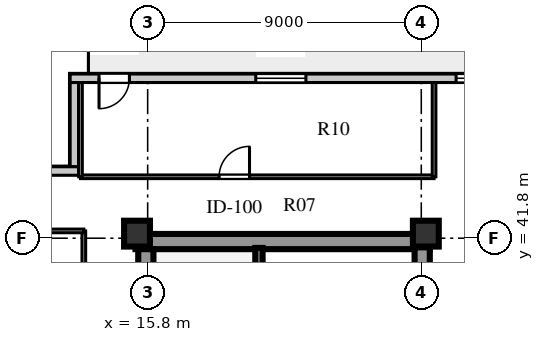
"""IFC4 building model, lengths in metres.
Left out: names, types, materials, properties, quantities, classifications, styles, units other than length and angle.
Written with IfcOpenShell. Run it as: python <this file> out.ifc"""

import sys

from ifc_helpers import new_model, si_unit, direction, frame, frame_2d, origin, origin_2d, place, context, subcontext, project, spatial, rectangle, extrude, element, fill, save


model = new_model("IFC4")
c1 = context("Model", 3, precision=1e-05, world=origin(), true_north=direction((0.0, 1.0)))
c2 = subcontext(c1, "Body", "Model", "MODEL_VIEW")
j1 = project(units=[si_unit("LENGTHUNIT", "METRE"), si_unit("PLANEANGLEUNIT", "RADIAN")], contexts=[c1])
p1 = place(None, origin())
s1 = spatial("IfcSite", under=j1, at=p1, CompositionType="ELEMENT")
p2 = place(p1, origin())
s2 = spatial("IfcBuilding", under=s1, at=p2, CompositionType="ELEMENT")
p3 = place(p2, frame((0.0, 0.0, 104.0)))
s3 = spatial("IfcBuildingStorey", under=s2, at=p3, CompositionType="ELEMENT", Elevation=104.0)
p4 = place(p3, frame((15.4, 41.69, 0.0), z_axis=(0.0, 0.0, 1.0), x_axis=(1.0, 0.0, 0.0)))
e1 = element("IfcWall", 1, at=p4, inside=s3, PredefinedType="SHEAR", context=c2, shape_type="SweptSolid", body=[
    extrude(rectangle(XDim=9.68, YDim=0.5, at=frame_2d((4.84, 0.0))), origin(), (0.0, 0.0, 1.0), 3.6),
])
p5 = place(p3, frame((15.74, 15.81, 0.0), z_axis=(0.0, 0.0, 1.0), x_axis=(0.0, 1.0, 0.0)))
e2 = element("IfcWall", 2, at=p5, inside=s3, PredefinedType="SHEAR", context=c2, shape_type="SweptSolid", body=[
    extrude(rectangle(XDim=25.63, YDim=0.5, at=frame_2d((12.815, 0.0))), origin(), (0.0, 0.0, 1.0), 3.6),
])
p6 = place(p3, frame((24.83, 15.74, 0.0), z_axis=(0.0, 0.0, 1.0), x_axis=(0.0, 1.0, 0.0)))
e3 = element("IfcWall", 3, at=p6, inside=s3, PredefinedType="SHEAR", context=c2, shape_type="SweptSolid", body=[
    extrude(rectangle(XDim=25.76, YDim=0.5, at=frame_2d((12.88, 0.0))), origin(), (0.0, 0.0, 1.0), 3.6),
])
p7 = place(p6, frame((1.61, 0.0, 0.0)))
e4 = element("IfcOpeningElement", 4, at=p7, cuts=e3, PredefinedType="OPENING", context=c2, shape_type="SweptSolid", body=[
    extrude(rectangle(XDim=1.2, YDim=2.1, at=frame_2d((0.6, 1.05))), frame((0.0, 0.26, 0.0), z_axis=(0.0, -1.0, 0.0), x_axis=(1.0, 0.0, 0.0)), (0.0, 0.0, 1.0), 0.52),
])
p8 = place(p6, frame((6.78, 0.0, 0.0)))
e5 = element("IfcOpeningElement", 5, at=p8, cuts=e3, PredefinedType="OPENING", context=c2, shape_type="SweptSolid", body=[
    extrude(rectangle(XDim=0.85, YDim=2.06, at=frame_2d((0.425, 1.03))), frame((0.0, 0.26, 0.0), z_axis=(0.0, -1.0, 0.0), x_axis=(1.0, 0.0, 0.0)), (0.0, 0.0, 1.0), 0.52),
])
p9 = place(p6, frame((12.11, 0.0, 0.0)))
e6 = element("IfcOpeningElement", 6, at=p9, cuts=e3, PredefinedType="OPENING", context=c2, shape_type="SweptSolid", body=[
    extrude(rectangle(XDim=1.5, YDim=2.12, at=frame_2d((0.75, 1.06))), frame((0.0, 0.26, 0.0), z_axis=(0.0, -1.0, 0.0), x_axis=(1.0, 0.0, 0.0)), (0.0, 0.0, 1.0), 0.52),
])
p10 = place(p6, frame((20.11, 0.0, 0.0)))
e7 = element("IfcOpeningElement", 7, at=p10, cuts=e3, PredefinedType="OPENING", context=c2, shape_type="SweptSolid", body=[
    extrude(rectangle(XDim=1.2, YDim=2.12, at=frame_2d((0.6, 1.06))), frame((0.0, 0.26, 0.0), z_axis=(0.0, -1.0, 0.0), x_axis=(1.0, 0.0, 0.0)), (0.0, 0.0, 1.0), 0.52),
])
p11 = place(p6, frame((24.01, 0.0, 0.0)))
e8 = element("IfcOpeningElement", 8, at=p11, cuts=e3, PredefinedType="OPENING", context=c2, shape_type="SweptSolid", body=[
    extrude(rectangle(XDim=0.95, YDim=2.1, at=frame_2d((0.475, 1.05))), frame((0.0, 0.26, 0.0), z_axis=(0.0, -1.0, 0.0), x_axis=(1.0, 0.0, 0.0)), (0.0, 0.0, 1.0), 0.52),
])
for number, where, z_axis, x_axis in (
    (9, (15.45, 41.95, 0.0), (0.0, 0.0, 1.0), (1.0, 0.0, 0.0)),
    (10, (24.95, 41.95, 0.0), (0.0, 0.0, 1.0), (1.0, 0.0, 0.0)),
):
    element("IfcColumn", number, at=place(p3, frame(where, z_axis=z_axis, x_axis=x_axis)), inside=s3, PredefinedType="COLUMN", context=c2, shape_type="SweptSolid", body=[
        extrude(rectangle(XDim=0.85, YDim=0.85, at=origin_2d()), origin(), (0.0, 0.0, 1.0), 3.6),
    ])
p12 = place(p3, frame((45.35, 47.06, 0.0), z_axis=(0.0, 0.0, 1.0), x_axis=(-1.0, 0.0, 0.0)))
e11 = element("IfcWall", 11, at=p12, inside=s3, PredefinedType="STANDARD", context=c2, shape_type="SweptSolid", body=[
    extrude(rectangle(XDim=32.1, YDim=0.28, at=frame_2d((16.05, 0.0))), origin(), (0.0, 0.0, 1.0), 3.6),
])
p13 = place(p12, frame((30.15, 0.0, 0.0)))
e12 = element("IfcOpeningElement", 12, at=p13, cuts=e11, PredefinedType="OPENING", context=c2, shape_type="SweptSolid", body=[
    extrude(rectangle(XDim=1.0, YDim=2.05, at=frame_2d((0.5, 1.025))), frame((0.0, 0.15, 0.0), z_axis=(0.0, -1.0, 0.0), x_axis=(1.0, 0.0, 0.0)), (0.0, 0.0, 1.0), 0.3),
])
p14 = place(p12, frame((24.345, 0.0, 0.8)))
e13 = element("IfcOpeningElement", 13, at=p14, cuts=e11, PredefinedType="OPENING", context=c2, shape_type="SweptSolid", body=[
    extrude(rectangle(XDim=1.65, YDim=1.95, at=frame_2d((0.825, 0.975))), frame((0.0, 0.15, 0.0), z_axis=(0.0, -1.0, 0.0), x_axis=(1.0, 0.0, 0.0)), (0.0, 0.0, 1.0), 0.3),
])
p15 = place(p12, frame((18.205, 0.0, 0.8)))
e14 = element("IfcOpeningElement", 14, at=p15, cuts=e11, PredefinedType="OPENING", context=c2, shape_type="SweptSolid", body=[
    extrude(rectangle(XDim=1.2, YDim=1.75, at=frame_2d((0.6, 0.875))), frame((0.0, 0.15, 0.0), z_axis=(0.0, -1.0, 0.0), x_axis=(1.0, 0.0, 0.0)), (0.0, 0.0, 1.0), 0.3),
])
p16 = place(p12, frame((15.815, 0.0, 0.8)))
e15 = element("IfcOpeningElement", 15, at=p16, cuts=e11, PredefinedType="OPENING", context=c2, shape_type="SweptSolid", body=[
    extrude(rectangle(XDim=1.2, YDim=1.75, at=frame_2d((0.6, 0.875))), frame((0.0, 0.15, 0.0), z_axis=(0.0, -1.0, 0.0), x_axis=(1.0, 0.0, 0.0)), (0.0, 0.0, 1.0), 0.3),
])
p17 = place(p12, frame((12.09, 0.0, 0.8)))
e16 = element("IfcOpeningElement", 16, at=p17, cuts=e11, PredefinedType="OPENING", context=c2, shape_type="SweptSolid", body=[
    extrude(rectangle(XDim=1.8, YDim=2.0, at=frame_2d((0.9, 1.0))), frame((0.0, 0.15, 0.0), z_axis=(0.0, -1.0, 0.0), x_axis=(1.0, 0.0, 0.0)), (0.0, 0.0, 1.0), 0.3),
])
p18 = place(p12, frame((6.83, 0.0, 0.8)))
e17 = element("IfcOpeningElement", 17, at=p18, cuts=e11, PredefinedType="OPENING", context=c2, shape_type="SweptSolid", body=[
    extrude(rectangle(XDim=1.5, YDim=2.0, at=frame_2d((0.75, 1.0))), frame((0.0, 0.15, 0.0), z_axis=(0.0, -1.0, 0.0), x_axis=(1.0, 0.0, 0.0)), (0.0, 0.0, 1.0), 0.3),
])
p19 = place(p12, frame((1.72, 0.0, 0.8)))
e18 = element("IfcOpeningElement", 18, at=p19, cuts=e11, PredefinedType="OPENING", context=c2, shape_type="SweptSolid", body=[
    extrude(rectangle(XDim=1.2, YDim=1.75, at=frame_2d((0.6, 0.875))), frame((0.0, 0.15, 0.0), z_axis=(0.0, -1.0, 0.0), x_axis=(1.0, 0.0, 0.0)), (0.0, 0.0, 1.0), 0.3),
])
p20 = place(p3, frame((13.39, 46.92, 0.0), z_axis=(0.0, 0.0, 1.0), x_axis=(0.0, -1.0, 0.0)))
e19 = element("IfcWall", 19, at=p20, inside=s3, PredefinedType="STANDARD", context=c2, shape_type="SweptSolid", body=[
    extrude(rectangle(XDim=2.77, YDim=0.28, at=frame_2d((1.385, 0.0))), origin(), (0.0, 0.0, 1.0), 3.6),
])
p21 = place(p3, frame((13.53, 44.01, 0.0), z_axis=(0.0, 0.0, 1.0), x_axis=(-1.0, 0.0, 0.0)))
e20 = element("IfcWall", 20, at=p21, inside=s3, PredefinedType="STANDARD", context=c2, shape_type="SweptSolid", body=[
    extrude(rectangle(XDim=3.33, YDim=0.28, at=frame_2d((1.665, 0.0))), origin(), (0.0, 0.0, 1.0), 3.6),
])
p22 = place(p3, frame((19.46, 33.3, 0.0), z_axis=(0.0, 0.0, 1.0), x_axis=(0.0, 1.0, 0.0)))
e21 = element("IfcWall", 21, at=p22, inside=s3, PredefinedType="SHEAR", context=c2, shape_type="SweptSolid", body=[
    extrude(rectangle(XDim=8.18, YDim=0.24, at=frame_2d((4.09, 0.0))), origin(), (0.0, 0.0, 1.0), 3.85),
])
p23 = place(p22, frame((0.65, 0.0, 0.0)))
e22 = element("IfcOpeningElement", 22, at=p23, cuts=e21, PredefinedType="OPENING", context=c2, shape_type="SweptSolid", body=[
    extrude(rectangle(XDim=1.1, YDim=2.1, at=frame_2d((0.55, 1.05))), frame((0.0, 0.13, 0.0), z_axis=(0.0, -1.0, 0.0), x_axis=(1.0, 0.0, 0.0)), (0.0, 0.0, 1.0), 0.26),
])
p24 = place(p3, frame((13.7, 15.16, 0.0), z_axis=(0.0, 0.0, 1.0), x_axis=(0.0, 1.0, 0.0)))
e23 = element("IfcWall", 23, at=p24, inside=s3, PredefinedType="PARTITIONING", context=c2, shape_type="SweptSolid", body=[
    extrude(rectangle(XDim=26.88, YDim=0.12, at=frame_2d((13.44, 0.0))), origin(), (0.0, 0.0, 1.0), 3.6),
])
p25 = place(p24, frame((0.91, 0.0, 0.0)))
e24 = element("IfcOpeningElement", 24, at=p25, cuts=e23, PredefinedType="OPENING", context=c2, shape_type="SweptSolid", body=[
    extrude(rectangle(XDim=0.95, YDim=2.1, at=frame_2d((0.475, 1.05))), frame((0.0, 0.07, 0.0), z_axis=(0.0, -1.0, 0.0), x_axis=(1.0, 0.0, 0.0)), (0.0, 0.0, 1.0), 0.14),
])
p26 = place(p3, frame((10.48, 42.04, 0.0), z_axis=(0.0, 0.0, 1.0), x_axis=(1.0, 0.0, 0.0)))
e25 = element("IfcWall", 25, at=p26, inside=s3, PredefinedType="PARTITIONING", context=c2, shape_type="SweptSolid", body=[
    extrude(rectangle(XDim=3.22, YDim=0.12, at=frame_2d((1.61, 0.0))), origin(), (0.0, 0.0, 1.0), 3.1),
])
p27 = place(p3, frame((13.59, 43.82, 0.0), z_axis=(0.0, 0.0, 1.0), x_axis=(1.0, 0.0, 0.0)))
e26 = element("IfcWall", 26, at=p27, inside=s3, PredefinedType="PARTITIONING", context=c2, shape_type="SweptSolid", body=[
    extrude(rectangle(XDim=11.63, YDim=0.12, at=frame_2d((5.815, 0.0))), origin(), (0.0, 0.0, 1.0), 3.6),
])
p28 = place(p27, frame((4.56, 0.0, 0.0)))
e27 = element("IfcOpeningElement", 27, at=p28, cuts=e26, PredefinedType="OPENING", context=c2, shape_type="SweptSolid", body=[
    extrude(rectangle(XDim=1.0, YDim=2.08, at=frame_2d((0.5, 1.04))), frame((0.0, 0.07, 0.0), z_axis=(0.0, -1.0, 0.0), x_axis=(1.0, 0.0, 0.0)), (0.0, 0.0, 1.0), 0.14),
])
p29 = place(p3, frame((13.59, 43.82, 0.0), z_axis=(0.0, 0.0, 1.0), x_axis=(0.0, 1.0, 0.0)))
e28 = element("IfcWall", 28, at=p29, inside=s3, PredefinedType="PARTITIONING", context=c2, shape_type="SweptSolid", body=[
    extrude(rectangle(XDim=3.1, YDim=0.12, at=frame_2d((1.55, 0.0))), origin(), (0.0, 0.0, 1.0), 3.6),
])
p30 = place(p3, frame((25.22, 43.82, 0.0), z_axis=(0.0, 0.0, 1.0), x_axis=(0.0, 1.0, 0.0)))
e29 = element("IfcWall", 29, at=p30, inside=s3, PredefinedType="PARTITIONING", context=c2, shape_type="SweptSolid", body=[
    extrude(rectangle(XDim=3.1, YDim=0.12, at=frame_2d((1.55, 0.0))), origin(), (0.0, 0.0, 1.0), 3.1),
])
p31 = place(p13, frame((1.0, 0.0, 0.0), z_axis=(0.0, 0.0, 1.0), x_axis=(-1.0, 0.0, 0.0)))
e30 = element("IfcDoor", 30, at=p31, inside=s3, OperationType="SINGLE_SWING_LEFT", PredefinedType="DOOR", context=c2, shape_type="SweptSolid", body=[
    extrude(rectangle(XDim=1.0, YDim=2.05, at=frame_2d((0.5, 1.025))), frame((0.0, 0.025, 0.0), z_axis=(0.0, -1.0, 0.0), x_axis=(1.0, 0.0, 0.0)), (0.0, 0.0, 1.0), 0.05),
])
fill(e12, e30)
p32 = place(p14, origin())
e31 = element("IfcWindow", 31, at=p32, inside=s3, PartitioningType="SINGLE_PANEL", PredefinedType="WINDOW", context=c2, shape_type="SweptSolid", body=[
    extrude(rectangle(XDim=1.65, YDim=1.95, at=frame_2d((0.825, 0.975))), frame((0.0, 0.03, 0.0), z_axis=(0.0, -1.0, 0.0), x_axis=(1.0, 0.0, 0.0)), (0.0, 0.0, 1.0), 0.06),
])
fill(e13, e31)
p33 = place(p15, origin())
e32 = element("IfcWindow", 32, at=p33, inside=s3, PartitioningType="SINGLE_PANEL", PredefinedType="WINDOW", context=c2, shape_type="SweptSolid", body=[
    extrude(rectangle(XDim=1.2, YDim=1.75, at=frame_2d((0.6, 0.875))), frame((0.0, 0.03, 0.0), z_axis=(0.0, -1.0, 0.0), x_axis=(1.0, 0.0, 0.0)), (0.0, 0.0, 1.0), 0.06),
])
fill(e14, e32)
p34 = place(p28, origin())
e33 = element("IfcDoor", 33, at=p34, inside=s3, OperationType="SINGLE_SWING_RIGHT", PredefinedType="DOOR", context=c2, shape_type="SweptSolid", body=[
    extrude(rectangle(XDim=1.0, YDim=2.08, at=frame_2d((0.5, 1.04))), frame((0.0, 0.025, 0.0), z_axis=(0.0, -1.0, 0.0), x_axis=(1.0, 0.0, 0.0)), (0.0, 0.0, 1.0), 0.05),
])
fill(e27, e33)
save(model, sys.argv[1])
